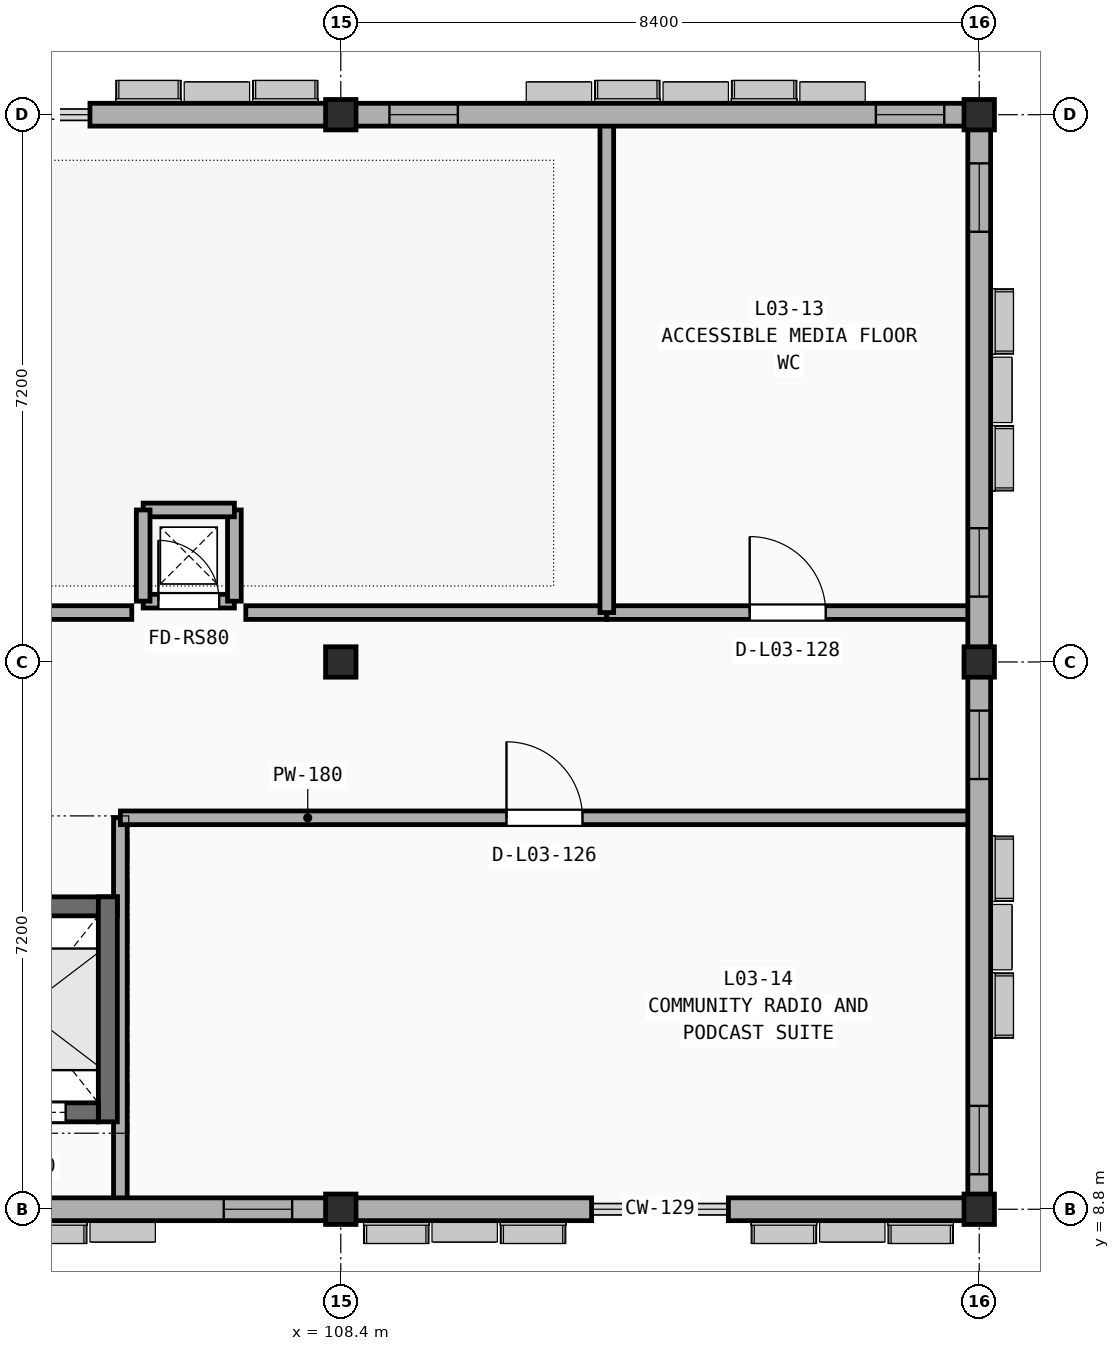
"""IFC4 building model, lengths in metres.
Left out: names, types, materials, properties, quantities, classifications, styles, units other than length and angle.
Written with IfcOpenShell. Run it as: python <this file> out.ifc"""

import sys

from ifc_helpers import new_model, si_unit, direction, frame, frame_2d, origin, origin_2d, place, context, subcontext, project, spatial, rectangle, extrude, element, fill, save


model = new_model("IFC4")
c1 = context("Model", 3, precision=1e-05, world=origin(), true_north=direction((0.0, 1.0)))
c2 = subcontext(c1, "Body", "Model", "MODEL_VIEW")
j1 = project(units=[si_unit("LENGTHUNIT", "METRE"), si_unit("PLANEANGLEUNIT", "RADIAN")], contexts=[c1])
p1 = place(None, origin())
s1 = spatial("IfcSite", under=j1, at=p1, CompositionType="ELEMENT")
p2 = place(p1, origin())
s2 = spatial("IfcBuilding", under=s1, at=p2, CompositionType="ELEMENT")
p3 = place(p2, frame((0.0, 0.0, 13.8)))
s3 = spatial("IfcBuildingStorey", under=s2, at=p3, CompositionType="ELEMENT", Elevation=13.8)
for number, where, z_axis, x_axis in (
    (1, (108.4, 8.8, 0.0), (0.0, 0.0, 1.0), (1.0, 0.0, 0.0)),
    (2, (108.4, 16.0, 0.0), (0.0, 0.0, 1.0), (1.0, 0.0, 0.0)),
    (3, (108.4, 23.2, 0.0), (0.0, 0.0, 1.0), (1.0, 0.0, 0.0)),
    (4, (116.8, 8.8, 0.0), (0.0, 0.0, 1.0), (1.0, 0.0, 0.0)),
    (5, (116.8, 16.0, 0.0), (0.0, 0.0, 1.0), (1.0, 0.0, 0.0)),
    (6, (116.8, 23.2, 0.0), (0.0, 0.0, 1.0), (1.0, 0.0, 0.0)),
):
    element("IfcColumn", number, at=place(p3, frame(where, z_axis=z_axis, x_axis=x_axis)), inside=s3, PredefinedType="COLUMN", context=c2, shape_type="SweptSolid", body=[
        extrude(rectangle(XDim=0.4, YDim=0.4, at=origin_2d()), origin(), (0.0, 0.0, 1.0), 3.9),
    ])
p4 = place(p3, frame((105.5, 8.94, 0.0), z_axis=(0.0, 0.0, 1.0), x_axis=(0.0, 1.0, 0.0)))
e7 = element("IfcWall", 7, at=p4, inside=s3, PredefinedType="PARTITIONING", context=c2, shape_type="SweptSolid", body=[
    extrude(rectangle(XDim=5.01, YDim=0.18, at=frame_2d((2.505, 0.0))), origin(), (0.0, 0.0, 1.0), 3.01),
])
p5 = place(p3, frame((105.5, 13.95, 0.0), z_axis=(0.0, 0.0, 1.0), x_axis=(1.0, 0.0, 0.0)))
e8 = element("IfcWall", 8, at=p5, inside=s3, PredefinedType="PARTITIONING", context=c2, shape_type="SweptSolid", body=[
    extrude(rectangle(XDim=11.16, YDim=0.18, at=frame_2d((5.58, 0.0))), origin(), (0.0, 0.0, 1.0), 3.09),
])
p6 = place(p5, frame((5.08, 0.0, -0.01)))
e9 = element("IfcOpeningElement", 9, at=p6, cuts=e8, PredefinedType="OPENING", context=c2, shape_type="SweptSolid", body=[
    extrude(rectangle(XDim=1.0, YDim=2.16, at=frame_2d((0.5, 1.08))), frame((0.0, 0.1, 0.0), z_axis=(0.0, -1.0, 0.0), x_axis=(1.0, 0.0, 0.0)), (0.0, 0.0, 1.0), 0.2),
])
p7 = place(p3, frame((91.74, 16.65, 0.0), z_axis=(0.0, 0.0, 1.0), x_axis=(1.0, 0.0, 0.0)))
e10 = element("IfcWall", 10, at=p7, inside=s3, PredefinedType="PARTITIONING", context=c2, shape_type="SweptSolid", body=[
    extrude(rectangle(XDim=13.91, YDim=0.18, at=frame_2d((6.955, 0.0))), origin(), (0.0, 0.0, 1.0), 3.09),
])
p8 = place(p7, frame((5.54, 0.0, -0.01)))
e11 = element("IfcOpeningElement", 11, at=p8, cuts=e10, PredefinedType="OPENING", context=c2, shape_type="SweptSolid", body=[
    extrude(rectangle(XDim=1.6, YDim=2.21, at=frame_2d((0.8, 1.105))), frame((0.0, 0.1, 0.0), z_axis=(0.0, -1.0, 0.0), x_axis=(1.0, 0.0, 0.0)), (0.0, 0.0, 1.0), 0.2),
])
p9 = place(p3, frame((107.15, 16.65, 0.0), z_axis=(0.0, 0.0, 1.0), x_axis=(1.0, 0.0, 0.0)))
e12 = element("IfcWall", 12, at=p9, inside=s3, PredefinedType="PARTITIONING", context=c2, shape_type="SweptSolid", body=[
    extrude(rectangle(XDim=4.75, YDim=0.18, at=frame_2d((2.375, 0.0))), origin(), (0.0, 0.0, 1.0), 3.09),
])
p10 = place(p3, frame((111.9, 16.65, 0.0), z_axis=(0.0, 0.0, 1.0), x_axis=(1.0, 0.0, 0.0)))
e13 = element("IfcWall", 13, at=p10, inside=s3, PredefinedType="PARTITIONING", context=c2, shape_type="SweptSolid", body=[
    extrude(rectangle(XDim=4.76, YDim=0.18, at=frame_2d((2.38, 0.0))), origin(), (0.0, 0.0, 1.0), 3.09),
])
p11 = place(p10, frame((1.88, 0.0, -0.01)))
e14 = element("IfcOpeningElement", 14, at=p11, cuts=e13, PredefinedType="OPENING", context=c2, shape_type="SweptSolid", body=[
    extrude(rectangle(XDim=1.0, YDim=2.16, at=frame_2d((0.5, 1.08))), frame((0.0, 0.1, 0.0), z_axis=(0.0, -1.0, 0.0), x_axis=(1.0, 0.0, 0.0)), (0.0, 0.0, 1.0), 0.2),
])
p12 = place(p3, frame((111.9, 16.65, 0.0), z_axis=(0.0, 0.0, 1.0), x_axis=(0.0, 1.0, 0.0)))
e15 = element("IfcWall", 15, at=p12, inside=s3, PredefinedType="PARTITIONING", context=c2, shape_type="SweptSolid", body=[
    extrude(rectangle(XDim=6.41, YDim=0.18, at=frame_2d((3.205, 0.0))), origin(), (0.0, 0.0, 1.0), 3.01),
])
p13 = place(p3, frame((100.0, 8.8, 0.0), z_axis=(0.0, 0.0, 1.0), x_axis=(1.0, 0.0, 0.0)))
e16 = element("IfcWall", 16, at=p13, inside=s3, PredefinedType="SOLIDWALL", context=c2, shape_type="SweptSolid", body=[
    extrude(rectangle(XDim=8.4, YDim=0.3, at=frame_2d((4.2, 0.0))), origin(), (0.0, 0.0, 1.0), 3.01),
])
p14 = place(p13, frame((0.46, 0.0, 0.85)))
e17 = element("IfcOpeningElement", 17, at=p14, cuts=e16, PredefinedType="OPENING", context=c2, shape_type="SweptSolid", body=[
    extrude(rectangle(XDim=0.9, YDim=2.02, at=frame_2d((0.45, 1.01))), frame((0.0, 0.16, 0.0), z_axis=(0.0, -1.0, 0.0), x_axis=(1.0, 0.0, 0.0)), (0.0, 0.0, 1.0), 0.32),
])
p15 = place(p13, frame((6.86, 0.0, 0.85)))
e18 = element("IfcOpeningElement", 18, at=p15, cuts=e16, PredefinedType="OPENING", context=c2, shape_type="SweptSolid", body=[
    extrude(rectangle(XDim=0.9, YDim=2.02, at=frame_2d((0.45, 1.01))), frame((0.0, 0.16, 0.0), z_axis=(0.0, -1.0, 0.0), x_axis=(1.0, 0.0, 0.0)), (0.0, 0.0, 1.0), 0.32),
])
for number, where, z_axis, x_axis in (
    (19, (108.4, 8.8, 0.0), (0.0, 0.0, 1.0), (1.0, 0.0, 0.0)),
    (20, (113.5, 8.8, 0.0), (0.0, 0.0, 1.0), (1.0, 0.0, 0.0)),
):
    element("IfcWall", number, at=place(p3, frame(where, z_axis=z_axis, x_axis=x_axis)), inside=s3, PredefinedType="SOLIDWALL", context=c2, shape_type="SweptSolid", body=[
        extrude(rectangle(XDim=3.3, YDim=0.3, at=frame_2d((1.65, 0.0))), origin(), (0.0, 0.0, 1.0), 3.01),
    ])
p16 = place(p3, frame((108.4, 23.2, 0.0), z_axis=(0.0, 0.0, 1.0), x_axis=(-1.0, 0.0, 0.0)))
e21 = element("IfcWall", 21, at=p16, inside=s3, PredefinedType="SOLIDWALL", context=c2, shape_type="SweptSolid", body=[
    extrude(rectangle(XDim=3.3, YDim=0.3, at=frame_2d((1.65, 0.0))), origin(), (0.0, 0.0, 1.0), 3.01),
])
p17 = place(p3, frame((116.8, 23.2, 0.0), z_axis=(0.0, 0.0, 1.0), x_axis=(-1.0, 0.0, 0.0)))
e22 = element("IfcWall", 22, at=p17, inside=s3, PredefinedType="SOLIDWALL", context=c2, shape_type="SweptSolid", body=[
    extrude(rectangle(XDim=8.4, YDim=0.3, at=frame_2d((4.2, 0.0))), origin(), (0.0, 0.0, 1.0), 3.01),
])
p18 = place(p17, frame((0.46, 0.0, 0.85)))
e23 = element("IfcOpeningElement", 23, at=p18, cuts=e22, PredefinedType="OPENING", context=c2, shape_type="SweptSolid", body=[
    extrude(rectangle(XDim=0.9, YDim=2.02, at=frame_2d((0.45, 1.01))), frame((0.0, 0.16, 0.0), z_axis=(0.0, -1.0, 0.0), x_axis=(1.0, 0.0, 0.0)), (0.0, 0.0, 1.0), 0.32),
])
p19 = place(p17, frame((6.86, 0.0, 0.85)))
e24 = element("IfcOpeningElement", 24, at=p19, cuts=e22, PredefinedType="OPENING", context=c2, shape_type="SweptSolid", body=[
    extrude(rectangle(XDim=0.9, YDim=2.02, at=frame_2d((0.45, 1.01))), frame((0.0, 0.16, 0.0), z_axis=(0.0, -1.0, 0.0), x_axis=(1.0, 0.0, 0.0)), (0.0, 0.0, 1.0), 0.32),
])
p20 = place(p3, frame((116.8, 8.8, 0.0), z_axis=(0.0, 0.0, 1.0), x_axis=(0.0, 1.0, 0.0)))
e25 = element("IfcWall", 25, at=p20, inside=s3, PredefinedType="SOLIDWALL", context=c2, shape_type="SweptSolid", body=[
    extrude(rectangle(XDim=7.2, YDim=0.3, at=frame_2d((3.6, 0.0))), origin(), (0.0, 0.0, 1.0), 3.01),
])
p21 = place(p20, frame((0.46, 0.0, 0.85)))
e26 = element("IfcOpeningElement", 26, at=p21, cuts=e25, PredefinedType="OPENING", context=c2, shape_type="SweptSolid", body=[
    extrude(rectangle(XDim=0.9, YDim=2.02, at=frame_2d((0.45, 1.01))), frame((0.0, 0.16, 0.0), z_axis=(0.0, -1.0, 0.0), x_axis=(1.0, 0.0, 0.0)), (0.0, 0.0, 1.0), 0.32),
])
p22 = place(p20, frame((5.66, 0.0, 0.85)))
e27 = element("IfcOpeningElement", 27, at=p22, cuts=e25, PredefinedType="OPENING", context=c2, shape_type="SweptSolid", body=[
    extrude(rectangle(XDim=0.9, YDim=2.02, at=frame_2d((0.45, 1.01))), frame((0.0, 0.16, 0.0), z_axis=(0.0, -1.0, 0.0), x_axis=(1.0, 0.0, 0.0)), (0.0, 0.0, 1.0), 0.32),
])
p23 = place(p3, frame((116.8, 16.0, 0.0), z_axis=(0.0, 0.0, 1.0), x_axis=(0.0, 1.0, 0.0)))
e28 = element("IfcWall", 28, at=p23, inside=s3, PredefinedType="SOLIDWALL", context=c2, shape_type="SweptSolid", body=[
    extrude(rectangle(XDim=7.2, YDim=0.3, at=frame_2d((3.6, 0.0))), origin(), (0.0, 0.0, 1.0), 3.01),
])
p24 = place(p23, frame((0.86, 0.0, 0.85)))
e29 = element("IfcOpeningElement", 29, at=p24, cuts=e28, PredefinedType="OPENING", context=c2, shape_type="SweptSolid", body=[
    extrude(rectangle(XDim=0.9, YDim=2.02, at=frame_2d((0.45, 1.01))), frame((0.0, 0.16, 0.0), z_axis=(0.0, -1.0, 0.0), x_axis=(1.0, 0.0, 0.0)), (0.0, 0.0, 1.0), 0.32),
])
p25 = place(p23, frame((5.66, 0.0, 0.85)))
e30 = element("IfcOpeningElement", 30, at=p25, cuts=e28, PredefinedType="OPENING", context=c2, shape_type="SweptSolid", body=[
    extrude(rectangle(XDim=0.9, YDim=2.02, at=frame_2d((0.45, 1.01))), frame((0.0, 0.16, 0.0), z_axis=(0.0, -1.0, 0.0), x_axis=(1.0, 0.0, 0.0)), (0.0, 0.0, 1.0), 0.32),
])
p26 = place(p3, frame((103.25, 12.785, 0.0), z_axis=(0.0, 0.0, 1.0), x_axis=(1.0, 0.0, 0.0)))
e31 = element("IfcWall", 31, at=p26, inside=s3, PredefinedType="SHEAR", context=c2, shape_type="SweptSolid", body=[
    extrude(rectangle(XDim=2.21, YDim=0.25, at=frame_2d((1.105, 0.0))), origin(), (0.0, 0.0, 1.0), 3.9),
])
p27 = place(p3, frame((105.335, 9.95, 0.0), z_axis=(0.0, 0.0, 1.0), x_axis=(0.0, 1.0, 0.0)))
e32 = element("IfcWall", 32, at=p27, inside=s3, PredefinedType="SHEAR", context=c2, shape_type="SweptSolid", body=[
    extrude(rectangle(XDim=2.96, YDim=0.25, at=frame_2d((1.48, 0.0))), origin(), (0.0, 0.0, 1.0), 3.9),
])
p28 = place(p3, frame((103.25, 10.075, 0.0), z_axis=(0.0, 0.0, 1.0), x_axis=(1.0, 0.0, 0.0)))
e33 = element("IfcWall", 33, at=p28, inside=s3, PredefinedType="SHEAR", context=c2, shape_type="SweptSolid", body=[
    extrude(rectangle(XDim=1.96, YDim=0.25, at=frame_2d((0.98, 0.0))), origin(), (0.0, 0.0, 1.0), 3.9),
])
p29 = place(p28, frame((0.43, 0.0, -0.01)))
e34 = element("IfcOpeningElement", 34, at=p29, cuts=e33, PredefinedType="OPENING", context=c2, shape_type="SweptSolid", body=[
    extrude(rectangle(XDim=1.1, YDim=2.16, at=frame_2d((0.55, 1.08))), frame((0.0, 0.135, 0.0), z_axis=(0.0, -1.0, 0.0), x_axis=(1.0, 0.0, 0.0)), (0.0, 0.0, 1.0), 0.27),
])
p30 = place(p3, frame((105.8, 16.8, 0.0), z_axis=(0.0, 0.0, 1.0), x_axis=(1.0, 0.0, 0.0)))
e35 = element("IfcWall", 35, at=p30, inside=s3, PredefinedType="SOLIDWALL", context=c2, shape_type="SweptSolid", body=[
    extrude(rectangle(XDim=1.2, YDim=0.18, at=frame_2d((0.6, 0.0))), origin(), (0.0, 0.0, 1.0), 3.69),
])
p31 = place(p30, frame((0.2, 0.0, -0.01)))
e36 = element("IfcOpeningElement", 36, at=p31, cuts=e35, PredefinedType="OPENING", context=c2, shape_type="SweptSolid", body=[
    extrude(rectangle(XDim=0.8, YDim=2.06, at=frame_2d((0.4, 1.03))), frame((0.0, 0.1, 0.0), z_axis=(0.0, -1.0, 0.0), x_axis=(1.0, 0.0, 0.0)), (0.0, 0.0, 1.0), 0.2),
])
for number, where, z_axis, x_axis in (
    (37, (107.0, 16.8, 0.0), (0.0, 0.0, 1.0), (0.0, 1.0, 0.0)),
    (38, (107.0, 18.0, 0.0), (0.0, 0.0, 1.0), (-1.0, 0.0, 0.0)),
    (39, (105.8, 18.0, 0.0), (0.0, 0.0, 1.0), (0.0, -1.0, 0.0)),
):
    element("IfcWall", number, at=place(p3, frame(where, z_axis=z_axis, x_axis=x_axis)), inside=s3, PredefinedType="SOLIDWALL", context=c2, shape_type="SweptSolid", body=[
        extrude(rectangle(XDim=1.2, YDim=0.18, at=frame_2d((0.6, 0.0))), origin(), (0.0, 0.0, 1.0), 3.69),
    ])
p32 = place(p6, frame((1.0, 0.0, 0.01), z_axis=(0.0, 0.0, 1.0), x_axis=(-1.0, 0.0, 0.0)))
e40 = element("IfcDoor", 40, at=p32, inside=s3, OperationType="SINGLE_SWING_LEFT", PredefinedType="DOOR", context=c2, shape_type="SweptSolid", body=[
    extrude(rectangle(XDim=1.0, YDim=2.15, at=frame_2d((0.5, 1.075))), frame((0.0, 0.025, 0.0), z_axis=(0.0, -1.0, 0.0), x_axis=(1.0, 0.0, 0.0)), (0.0, 0.0, 1.0), 0.05),
])
fill(e9, e40)
p33 = place(p11, frame((0.0, 0.0, 0.01)))
e41 = element("IfcDoor", 41, at=p33, inside=s3, OperationType="SINGLE_SWING_LEFT", PredefinedType="DOOR", context=c2, shape_type="SweptSolid", body=[
    extrude(rectangle(XDim=1.0, YDim=2.15, at=frame_2d((0.5, 1.075))), frame((0.0, 0.025, 0.0), z_axis=(0.0, -1.0, 0.0), x_axis=(1.0, 0.0, 0.0)), (0.0, 0.0, 1.0), 0.05),
])
fill(e14, e41)
p34 = place(p15, origin())
e42 = element("IfcWindow", 42, at=p34, inside=s3, PartitioningType="SINGLE_PANEL", PredefinedType="WINDOW", context=c2, shape_type="SweptSolid", body=[
    extrude(rectangle(XDim=0.9, YDim=2.02, at=frame_2d((0.45, 1.01))), frame((0.0, 0.03, 0.0), z_axis=(0.0, -1.0, 0.0), x_axis=(1.0, 0.0, 0.0)), (0.0, 0.0, 1.0), 0.06),
])
fill(e18, e42)
p35 = place(p18, origin())
e43 = element("IfcWindow", 43, at=p35, inside=s3, PartitioningType="SINGLE_PANEL", PredefinedType="WINDOW", context=c2, shape_type="SweptSolid", body=[
    extrude(rectangle(XDim=0.9, YDim=2.02, at=frame_2d((0.45, 1.01))), frame((0.0, 0.03, 0.0), z_axis=(0.0, -1.0, 0.0), x_axis=(1.0, 0.0, 0.0)), (0.0, 0.0, 1.0), 0.06),
])
fill(e23, e43)
p36 = place(p19, origin())
e44 = element("IfcWindow", 44, at=p36, inside=s3, PartitioningType="SINGLE_PANEL", PredefinedType="WINDOW", context=c2, shape_type="SweptSolid", body=[
    extrude(rectangle(XDim=0.9, YDim=2.02, at=frame_2d((0.45, 1.01))), frame((0.0, 0.03, 0.0), z_axis=(0.0, -1.0, 0.0), x_axis=(1.0, 0.0, 0.0)), (0.0, 0.0, 1.0), 0.06),
])
fill(e24, e44)
p37 = place(p21, origin())
e45 = element("IfcWindow", 45, at=p37, inside=s3, PartitioningType="SINGLE_PANEL", PredefinedType="WINDOW", context=c2, shape_type="SweptSolid", body=[
    extrude(rectangle(XDim=0.9, YDim=2.02, at=frame_2d((0.45, 1.01))), frame((0.0, 0.03, 0.0), z_axis=(0.0, -1.0, 0.0), x_axis=(1.0, 0.0, 0.0)), (0.0, 0.0, 1.0), 0.06),
])
fill(e26, e45)
p38 = place(p22, origin())
e46 = element("IfcWindow", 46, at=p38, inside=s3, PartitioningType="SINGLE_PANEL", PredefinedType="WINDOW", context=c2, shape_type="SweptSolid", body=[
    extrude(rectangle(XDim=0.9, YDim=2.02, at=frame_2d((0.45, 1.01))), frame((0.0, 0.03, 0.0), z_axis=(0.0, -1.0, 0.0), x_axis=(1.0, 0.0, 0.0)), (0.0, 0.0, 1.0), 0.06),
])
fill(e27, e46)
p39 = place(p24, origin())
e47 = element("IfcWindow", 47, at=p39, inside=s3, PartitioningType="SINGLE_PANEL", PredefinedType="WINDOW", context=c2, shape_type="SweptSolid", body=[
    extrude(rectangle(XDim=0.9, YDim=2.02, at=frame_2d((0.45, 1.01))), frame((0.0, 0.03, 0.0), z_axis=(0.0, -1.0, 0.0), x_axis=(1.0, 0.0, 0.0)), (0.0, 0.0, 1.0), 0.06),
])
fill(e29, e47)
p40 = place(p25, origin())
e48 = element("IfcWindow", 48, at=p40, inside=s3, PartitioningType="SINGLE_PANEL", PredefinedType="WINDOW", context=c2, shape_type="SweptSolid", body=[
    extrude(rectangle(XDim=0.9, YDim=2.02, at=frame_2d((0.45, 1.01))), frame((0.0, 0.03, 0.0), z_axis=(0.0, -1.0, 0.0), x_axis=(1.0, 0.0, 0.0)), (0.0, 0.0, 1.0), 0.06),
])
fill(e30, e48)
p41 = place(p29, frame((0.0, 0.0, 0.01)))
e49 = element("IfcDoor", 49, at=p41, inside=s3, OperationType="SLIDING_TO_LEFT", PredefinedType="DOOR", context=c2, shape_type="SweptSolid", body=[
    extrude(rectangle(XDim=1.1, YDim=2.15, at=frame_2d((0.55, 1.075))), frame((0.0, 0.025, 0.0), z_axis=(0.0, -1.0, 0.0), x_axis=(1.0, 0.0, 0.0)), (0.0, 0.0, 1.0), 0.05),
])
fill(e34, e49)
p42 = place(p31, frame((0.0, 0.0, 0.01)))
e50 = element("IfcDoor", 50, at=p42, inside=s3, OperationType="SINGLE_SWING_LEFT", PredefinedType="DOOR", context=c2, shape_type="SweptSolid", body=[
    extrude(rectangle(XDim=0.8, YDim=2.05, at=frame_2d((0.4, 1.025))), frame((0.0, 0.025, 0.0), z_axis=(0.0, -1.0, 0.0), x_axis=(1.0, 0.0, 0.0)), (0.0, 0.0, 1.0), 0.05),
])
fill(e36, e50)
save(model, sys.argv[1])
